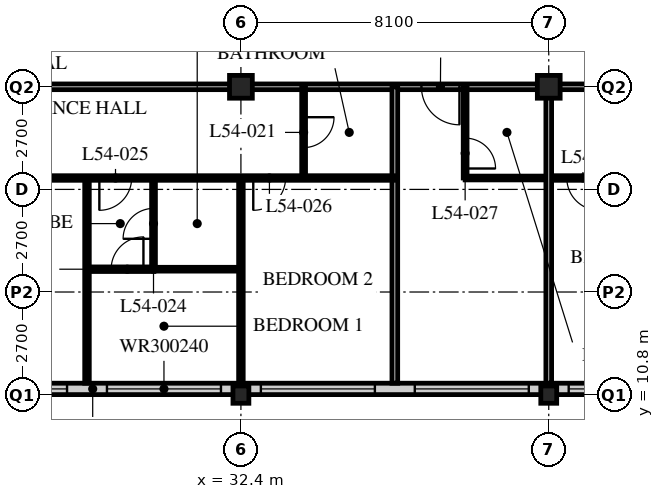
"""IFC4 building model, lengths in metres.
Left out: names, types, materials, properties, quantities, classifications, styles, units other than length and angle.
Written with IfcOpenShell. Run it as: python <this file> out.ifc"""

import sys

from ifc_helpers import new_model, si_unit, direction, frame, frame_2d, origin, origin_2d, place, context, subcontext, project, spatial, rectangle, hollow_rectangle, i_section, extrude, element, fill, save


model = new_model("IFC4")
c1 = context("Model", 3, precision=1e-05, world=origin(), true_north=direction((0.0, 1.0)))
c2 = subcontext(c1, "Body", "Model", "MODEL_VIEW")
j1 = project(units=[si_unit("LENGTHUNIT", "METRE"), si_unit("PLANEANGLEUNIT", "RADIAN")], contexts=[c1])
p1 = place(None, origin())
s1 = spatial("IfcSite", under=j1, at=p1, CompositionType="ELEMENT")
p2 = place(p1, origin())
s2 = spatial("IfcBuilding", under=s1, at=p2, CompositionType="ELEMENT")
p3 = place(p2, frame((0.0, 0.0, 210.0)))
s3 = spatial("IfcBuildingStorey", under=s2, at=p3, CompositionType="ELEMENT", Elevation=210.0)
p4 = place(p3, frame((32.4, 10.8, 0.0), z_axis=(0.0, 0.0, 1.0), x_axis=(1.0, 0.0, 0.0)))
e1 = element("IfcColumn", 1, at=p4, inside=s3, PredefinedType="COLUMN", context=c2, shape_type="SweptSolid", body=[
    extrude(i_section(OverallWidth=0.418, OverallDepth=0.456, WebThickness=0.042, FlangeThickness=0.067, FilletRadius=0.015, at=origin_2d()), origin(), (0.0, 0.0, 1.0), 3.6),
])
p5 = place(p3, frame((32.4, 18.9, 0.0), z_axis=(0.0, 0.0, 1.0), x_axis=(1.0, 0.0, 0.0)))
e2 = element("IfcColumn", 2, at=p5, inside=s3, PredefinedType="COLUMN", context=c2, shape_type="SweptSolid", body=[
    extrude(hollow_rectangle(XDim=0.6, YDim=0.6, WallThickness=0.05, at=origin_2d()), origin(), (0.0, 0.0, 1.0), 3.6),
])
p6 = place(p3, frame((40.5, 10.8, 0.0), z_axis=(0.0, 0.0, 1.0), x_axis=(1.0, 0.0, 0.0)))
e3 = element("IfcColumn", 3, at=p6, inside=s3, PredefinedType="COLUMN", context=c2, shape_type="SweptSolid", body=[
    extrude(i_section(OverallWidth=0.418, OverallDepth=0.456, WebThickness=0.042, FlangeThickness=0.067, FilletRadius=0.015, at=origin_2d()), origin(), (0.0, 0.0, 1.0), 3.6),
])
p7 = place(p3, frame((40.5, 18.9, 0.0), z_axis=(0.0, 0.0, 1.0), x_axis=(1.0, 0.0, 0.0)))
e4 = element("IfcColumn", 4, at=p7, inside=s3, PredefinedType="COLUMN", context=c2, shape_type="SweptSolid", body=[
    extrude(hollow_rectangle(XDim=0.6, YDim=0.6, WallThickness=0.05, at=origin_2d()), origin(), (0.0, 0.0, 1.0), 3.6),
])
p8 = place(p3, frame((8.4, 10.95, 0.0), z_axis=(0.0, 0.0, 1.0), x_axis=(1.0, 0.0, 0.0)))
e5 = element("IfcWall", 5, at=p8, inside=s3, PredefinedType="SOLIDWALL", context=c2, shape_type="SweptSolid", body=[
    extrude(rectangle(XDim=40.2, YDim=0.3, at=frame_2d((20.1, 0.0))), origin(), (0.0, 0.0, 1.0), 3.39),
])
p9 = place(p8, frame((0.225, 0.0, 0.6)))
e6 = element("IfcOpeningElement", 6, at=p9, cuts=e5, PredefinedType="OPENING", context=c2, shape_type="SweptSolid", body=[
    extrude(rectangle(XDim=3.0, YDim=2.4, at=frame_2d((1.5, 1.2))), frame((0.0, 0.16, 0.0), z_axis=(0.0, -1.0, 0.0), x_axis=(1.0, 0.0, 0.0)), (0.0, 0.0, 1.0), 0.32),
])
p10 = place(p8, frame((4.275, 0.0, 0.6)))
e7 = element("IfcOpeningElement", 7, at=p10, cuts=e5, PredefinedType="OPENING", context=c2, shape_type="SweptSolid", body=[
    extrude(rectangle(XDim=3.0, YDim=2.4, at=frame_2d((1.5, 1.2))), frame((0.0, 0.16, 0.0), z_axis=(0.0, -1.0, 0.0), x_axis=(1.0, 0.0, 0.0)), (0.0, 0.0, 1.0), 0.32),
])
p11 = place(p8, frame((8.325, 0.0, 0.6)))
e8 = element("IfcOpeningElement", 8, at=p11, cuts=e5, PredefinedType="OPENING", context=c2, shape_type="SweptSolid", body=[
    extrude(rectangle(XDim=3.0, YDim=2.4, at=frame_2d((1.5, 1.2))), frame((0.0, 0.16, 0.0), z_axis=(0.0, -1.0, 0.0), x_axis=(1.0, 0.0, 0.0)), (0.0, 0.0, 1.0), 0.32),
])
p12 = place(p8, frame((12.375, 0.0, 0.6)))
e9 = element("IfcOpeningElement", 9, at=p12, cuts=e5, PredefinedType="OPENING", context=c2, shape_type="SweptSolid", body=[
    extrude(rectangle(XDim=3.0, YDim=2.4, at=frame_2d((1.5, 1.2))), frame((0.0, 0.16, 0.0), z_axis=(0.0, -1.0, 0.0), x_axis=(1.0, 0.0, 0.0)), (0.0, 0.0, 1.0), 0.32),
])
p13 = place(p8, frame((16.425, 0.0, 0.6)))
e10 = element("IfcOpeningElement", 10, at=p13, cuts=e5, PredefinedType="OPENING", context=c2, shape_type="SweptSolid", body=[
    extrude(rectangle(XDim=3.0, YDim=2.4, at=frame_2d((1.5, 1.2))), frame((0.0, 0.16, 0.0), z_axis=(0.0, -1.0, 0.0), x_axis=(1.0, 0.0, 0.0)), (0.0, 0.0, 1.0), 0.32),
])
p14 = place(p8, frame((20.475, 0.0, 0.6)))
e11 = element("IfcOpeningElement", 11, at=p14, cuts=e5, PredefinedType="OPENING", context=c2, shape_type="SweptSolid", body=[
    extrude(rectangle(XDim=3.0, YDim=2.4, at=frame_2d((1.5, 1.2))), frame((0.0, 0.16, 0.0), z_axis=(0.0, -1.0, 0.0), x_axis=(1.0, 0.0, 0.0)), (0.0, 0.0, 1.0), 0.32),
])
p15 = place(p8, frame((24.525, 0.0, 0.6)))
e12 = element("IfcOpeningElement", 12, at=p15, cuts=e5, PredefinedType="OPENING", context=c2, shape_type="SweptSolid", body=[
    extrude(rectangle(XDim=3.0, YDim=2.4, at=frame_2d((1.5, 1.2))), frame((0.0, 0.16, 0.0), z_axis=(0.0, -1.0, 0.0), x_axis=(1.0, 0.0, 0.0)), (0.0, 0.0, 1.0), 0.32),
])
p16 = place(p8, frame((28.575, 0.0, 0.6)))
e13 = element("IfcOpeningElement", 13, at=p16, cuts=e5, PredefinedType="OPENING", context=c2, shape_type="SweptSolid", body=[
    extrude(rectangle(XDim=3.0, YDim=2.4, at=frame_2d((1.5, 1.2))), frame((0.0, 0.16, 0.0), z_axis=(0.0, -1.0, 0.0), x_axis=(1.0, 0.0, 0.0)), (0.0, 0.0, 1.0), 0.32),
])
p17 = place(p8, frame((32.625, 0.0, 0.6)))
e14 = element("IfcOpeningElement", 14, at=p17, cuts=e5, PredefinedType="OPENING", context=c2, shape_type="SweptSolid", body=[
    extrude(rectangle(XDim=3.0, YDim=2.4, at=frame_2d((1.5, 1.2))), frame((0.0, 0.16, 0.0), z_axis=(0.0, -1.0, 0.0), x_axis=(1.0, 0.0, 0.0)), (0.0, 0.0, 1.0), 0.32),
])
p18 = place(p8, frame((36.675, 0.0, 0.6)))
e15 = element("IfcOpeningElement", 15, at=p18, cuts=e5, PredefinedType="OPENING", context=c2, shape_type="SweptSolid", body=[
    extrude(rectangle(XDim=3.0, YDim=2.4, at=frame_2d((1.5, 1.2))), frame((0.0, 0.16, 0.0), z_axis=(0.0, -1.0, 0.0), x_axis=(1.0, 0.0, 0.0)), (0.0, 0.0, 1.0), 0.32),
])
p19 = place(p3, frame((8.1, 18.9, 0.0), z_axis=(0.0, 0.0, 1.0), x_axis=(1.0, 0.0, 0.0)))
e16 = element("IfcWall", 16, at=p19, inside=s3, PredefinedType="PARTITIONING", context=c2, shape_type="SweptSolid", body=[
    extrude(rectangle(XDim=36.45, YDim=0.15, at=frame_2d((18.225, 0.0))), origin(), (0.0, 0.0, 1.0), 2.778),
])
p20 = place(p19, frame((4.45, 0.0, 0.0)))
e17 = element("IfcOpeningElement", 17, at=p20, cuts=e16, PredefinedType="OPENING", context=c2, shape_type="SweptSolid", body=[
    extrude(rectangle(XDim=1.0, YDim=2.1, at=frame_2d((0.5, 1.05))), frame((0.0, 0.085, 0.0), z_axis=(0.0, -1.0, 0.0), x_axis=(1.0, 0.0, 0.0)), (0.0, 0.0, 1.0), 0.17),
])
p21 = place(p19, frame((12.55, 0.0, 0.0)))
e18 = element("IfcOpeningElement", 18, at=p21, cuts=e16, PredefinedType="OPENING", context=c2, shape_type="SweptSolid", body=[
    extrude(rectangle(XDim=1.0, YDim=2.1, at=frame_2d((0.5, 1.05))), frame((0.0, 0.085, 0.0), z_axis=(0.0, -1.0, 0.0), x_axis=(1.0, 0.0, 0.0)), (0.0, 0.0, 1.0), 0.17),
])
p22 = place(p19, frame((29.05, 0.0, 0.0)))
e19 = element("IfcOpeningElement", 19, at=p22, cuts=e16, PredefinedType="OPENING", context=c2, shape_type="SweptSolid", body=[
    extrude(rectangle(XDim=1.0, YDim=2.1, at=frame_2d((0.5, 1.05))), frame((0.0, 0.085, 0.0), z_axis=(0.0, -1.0, 0.0), x_axis=(1.0, 0.0, 0.0)), (0.0, 0.0, 1.0), 0.17),
])
p23 = place(p19, frame((2.625, 0.0, 0.0)))
e20 = element("IfcOpeningElement", 20, at=p23, cuts=e16, PredefinedType="OPENING", context=c2, shape_type="SweptSolid", body=[
    extrude(rectangle(XDim=1.0, YDim=2.1, at=frame_2d((0.5, 1.05))), frame((0.0, 0.085, 0.0), z_axis=(0.0, -1.0, 0.0), x_axis=(1.0, 0.0, 0.0)), (0.0, 0.0, 1.0), 0.17),
])
p24 = place(p19, frame((33.925, 0.0, 0.0)))
e21 = element("IfcOpeningElement", 21, at=p24, cuts=e16, PredefinedType="OPENING", context=c2, shape_type="SweptSolid", body=[
    extrude(rectangle(XDim=1.0, YDim=2.1, at=frame_2d((0.5, 1.05))), frame((0.0, 0.085, 0.0), z_axis=(0.0, -1.0, 0.0), x_axis=(1.0, 0.0, 0.0)), (0.0, 0.0, 1.0), 0.17),
])
p25 = place(p3, frame((34.05, 18.9, 0.0), z_axis=(0.0, 0.0, 1.0), x_axis=(0.0, -1.0, 0.0)))
e22 = element("IfcWall", 22, at=p25, inside=s3, PredefinedType="PARTITIONING", context=c2, shape_type="SweptSolid", body=[
    extrude(rectangle(XDim=2.4, YDim=0.1, at=frame_2d((1.2, 0.0))), origin(), (0.0, 0.0, 1.0), 3.39),
])
p26 = place(p25, frame((0.8, 0.0, 0.0)))
e23 = element("IfcOpeningElement", 23, at=p26, cuts=e22, PredefinedType="OPENING", context=c2, shape_type="SweptSolid", body=[
    extrude(rectangle(XDim=0.8, YDim=2.1, at=frame_2d((0.4, 1.05))), frame((0.0, 0.06, 0.0), z_axis=(0.0, -1.0, 0.0), x_axis=(1.0, 0.0, 0.0)), (0.0, 0.0, 1.0), 0.12),
])
p27 = place(p3, frame((30.1, 16.5, 0.0), z_axis=(0.0, 0.0, 1.0), x_axis=(0.0, -1.0, 0.0)))
e24 = element("IfcWall", 24, at=p27, inside=s3, PredefinedType="PARTITIONING", context=c2, shape_type="SweptSolid", body=[
    extrude(rectangle(XDim=2.4, YDim=0.1, at=frame_2d((1.2, 0.0))), origin(), (0.0, 0.0, 1.0), 3.39),
])
p28 = place(p27, frame((0.8, 0.0, 0.0)))
e25 = element("IfcOpeningElement", 25, at=p28, cuts=e24, PredefinedType="OPENING", context=c2, shape_type="SweptSolid", body=[
    extrude(rectangle(XDim=0.8, YDim=2.1, at=frame_2d((0.4, 1.05))), frame((0.0, 0.06, 0.0), z_axis=(0.0, -1.0, 0.0), x_axis=(1.0, 0.0, 0.0)), (0.0, 0.0, 1.0), 0.12),
])
p29 = place(p3, frame((30.1, 14.1, 0.0), z_axis=(0.0, 0.0, 1.0), x_axis=(1.0, 0.0, 0.0)))
e26 = element("IfcWall", 26, at=p29, inside=s3, PredefinedType="PARTITIONING", context=c2, shape_type="SweptSolid", body=[
    extrude(rectangle(XDim=2.3, YDim=0.1, at=frame_2d((1.15, 0.0))), origin(), (0.0, 0.0, 1.0), 3.39),
])
p30 = place(p3, frame((28.35, 16.5, 0.0), z_axis=(0.0, 0.0, 1.0), x_axis=(0.0, -1.0, 0.0)))
e27 = element("IfcWall", 27, at=p30, inside=s3, PredefinedType="PARTITIONING", context=c2, shape_type="SweptSolid", body=[
    extrude(rectangle(XDim=5.4, YDim=0.12, at=frame_2d((2.7, 0.0))), origin(), (0.0, 0.0, 1.0), 3.39),
])
p31 = place(p3, frame((32.4, 16.5, 0.0), z_axis=(0.0, 0.0, 1.0), x_axis=(0.0, -1.0, 0.0)))
e28 = element("IfcWall", 28, at=p31, inside=s3, PredefinedType="PARTITIONING", context=c2, shape_type="SweptSolid", body=[
    extrude(rectangle(XDim=5.4, YDim=0.12, at=frame_2d((2.7, 0.0))), origin(), (0.0, 0.0, 1.0), 2.778),
])
p32 = place(p3, frame((36.45, 18.9, 0.0), z_axis=(0.0, 0.0, 1.0), x_axis=(0.0, -1.0, 0.0)))
e29 = element("IfcWall", 29, at=p32, inside=s3, PredefinedType="PARTITIONING", context=c2, shape_type="SweptSolid", body=[
    extrude(rectangle(XDim=7.8, YDim=0.15, at=frame_2d((3.9, 0.0))), origin(), (0.0, 0.0, 1.0), 3.39),
])
p33 = place(p3, frame((38.3, 16.5, 0.0), z_axis=(0.0, 0.0, 1.0), x_axis=(1.0, 0.0, 0.0)))
e30 = element("IfcWall", 30, at=p33, inside=s3, PredefinedType="PARTITIONING", context=c2, shape_type="SweptSolid", body=[
    extrude(rectangle(XDim=2.2, YDim=0.1, at=frame_2d((1.1, 0.0))), origin(), (0.0, 0.0, 1.0), 3.39),
])
p34 = place(p3, frame((38.3, 18.9, 0.0), z_axis=(0.0, 0.0, 1.0), x_axis=(0.0, -1.0, 0.0)))
e31 = element("IfcWall", 31, at=p34, inside=s3, PredefinedType="PARTITIONING", context=c2, shape_type="SweptSolid", body=[
    extrude(rectangle(XDim=2.4, YDim=0.1, at=frame_2d((1.2, 0.0))), origin(), (0.0, 0.0, 1.0), 3.39),
])
p35 = place(p34, frame((1.35, 0.0, 0.0)))
e32 = element("IfcOpeningElement", 32, at=p35, cuts=e31, PredefinedType="OPENING", context=c2, shape_type="SweptSolid", body=[
    extrude(rectangle(XDim=0.8, YDim=2.1, at=frame_2d((0.4, 1.05))), frame((0.0, 0.06, 0.0), z_axis=(0.0, -1.0, 0.0), x_axis=(1.0, 0.0, 0.0)), (0.0, 0.0, 1.0), 0.12),
])
p36 = place(p3, frame((8.1, 16.5, 0.0), z_axis=(0.0, 0.0, 1.0), x_axis=(1.0, 0.0, 0.0)))
e33 = element("IfcWall", 33, at=p36, inside=s3, PredefinedType="PARTITIONING", context=c2, shape_type="SweptSolid", body=[
    extrude(rectangle(XDim=28.35, YDim=0.12, at=frame_2d((14.175, 0.0))), origin(), (0.0, 0.0, 1.0), 3.39),
])
p37 = place(p36, frame((5.025, 0.0, 0.0)))
e34 = element("IfcOpeningElement", 34, at=p37, cuts=e33, PredefinedType="OPENING", context=c2, shape_type="SweptSolid", body=[
    extrude(rectangle(XDim=0.85, YDim=2.1, at=frame_2d((0.425, 1.05))), frame((0.0, 0.07, 0.0), z_axis=(0.0, -1.0, 0.0), x_axis=(1.0, 0.0, 0.0)), (0.0, 0.0, 1.0), 0.14),
])
p38 = place(p36, frame((8.425, 0.0, 0.0)))
e35 = element("IfcOpeningElement", 35, at=p38, cuts=e33, PredefinedType="OPENING", context=c2, shape_type="SweptSolid", body=[
    extrude(rectangle(XDim=0.85, YDim=2.1, at=frame_2d((0.425, 1.05))), frame((0.0, 0.07, 0.0), z_axis=(0.0, -1.0, 0.0), x_axis=(1.0, 0.0, 0.0)), (0.0, 0.0, 1.0), 0.14),
])
p39 = place(p36, frame((13.125, 0.0, 0.0)))
e36 = element("IfcOpeningElement", 36, at=p39, cuts=e33, PredefinedType="OPENING", context=c2, shape_type="SweptSolid", body=[
    extrude(rectangle(XDim=0.85, YDim=2.1, at=frame_2d((0.425, 1.05))), frame((0.0, 0.07, 0.0), z_axis=(0.0, -1.0, 0.0), x_axis=(1.0, 0.0, 0.0)), (0.0, 0.0, 1.0), 0.14),
])
p40 = place(p36, frame((20.575, 0.0, 0.0)))
e37 = element("IfcOpeningElement", 37, at=p40, cuts=e33, PredefinedType="OPENING", context=c2, shape_type="SweptSolid", body=[
    extrude(rectangle(XDim=0.85, YDim=2.1, at=frame_2d((0.425, 1.05))), frame((0.0, 0.07, 0.0), z_axis=(0.0, -1.0, 0.0), x_axis=(1.0, 0.0, 0.0)), (0.0, 0.0, 1.0), 0.14),
])
p41 = place(p36, frame((24.625, 0.0, 0.0)))
e38 = element("IfcOpeningElement", 38, at=p41, cuts=e33, PredefinedType="OPENING", context=c2, shape_type="SweptSolid", body=[
    extrude(rectangle(XDim=0.85, YDim=2.1, at=frame_2d((0.425, 1.05))), frame((0.0, 0.07, 0.0), z_axis=(0.0, -1.0, 0.0), x_axis=(1.0, 0.0, 0.0)), (0.0, 0.0, 1.0), 0.14),
])
p42 = place(p36, frame((2.725, 0.0, 0.0)))
e39 = element("IfcOpeningElement", 39, at=p42, cuts=e33, PredefinedType="OPENING", context=c2, shape_type="SweptSolid", body=[
    extrude(rectangle(XDim=0.85, YDim=2.1, at=frame_2d((0.425, 1.05))), frame((0.0, 0.07, 0.0), z_axis=(0.0, -1.0, 0.0), x_axis=(1.0, 0.0, 0.0)), (0.0, 0.0, 1.0), 0.14),
])
p43 = place(p3, frame((40.5, 16.5, 0.0), z_axis=(0.0, 0.0, 1.0), x_axis=(1.0, 0.0, 0.0)))
e40 = element("IfcWall", 40, at=p43, inside=s3, PredefinedType="PARTITIONING", context=c2, shape_type="SweptSolid", body=[
    extrude(rectangle(XDim=8.05, YDim=0.12, at=frame_2d((4.025, 0.0))), origin(), (0.0, 0.0, 1.0), 3.39),
])
p44 = place(p43, frame((0.475, 0.0, 0.0)))
e41 = element("IfcOpeningElement", 41, at=p44, cuts=e40, PredefinedType="OPENING", context=c2, shape_type="SweptSolid", body=[
    extrude(rectangle(XDim=0.85, YDim=2.1, at=frame_2d((0.425, 1.05))), frame((0.0, 0.07, 0.0), z_axis=(0.0, -1.0, 0.0), x_axis=(1.0, 0.0, 0.0)), (0.0, 0.0, 1.0), 0.14),
])
p45 = place(p43, frame((4.325, 0.0, 0.0)))
e42 = element("IfcOpeningElement", 42, at=p45, cuts=e40, PredefinedType="OPENING", context=c2, shape_type="SweptSolid", body=[
    extrude(rectangle(XDim=0.85, YDim=2.1, at=frame_2d((0.425, 1.05))), frame((0.0, 0.07, 0.0), z_axis=(0.0, -1.0, 0.0), x_axis=(1.0, 0.0, 0.0)), (0.0, 0.0, 1.0), 0.14),
])
p46 = place(p3, frame((40.5, 18.9, 0.0), z_axis=(0.0, 0.0, 1.0), x_axis=(0.0, -1.0, 0.0)))
e43 = element("IfcWall", 43, at=p46, inside=s3, PredefinedType="PARTITIONING", context=c2, shape_type="SweptSolid", body=[
    extrude(rectangle(XDim=7.8, YDim=0.15, at=frame_2d((3.9, 0.0))), origin(), (0.0, 0.0, 1.0), 2.778),
])
p47 = place(p3, frame((30.11, 14.1, 0.0), z_axis=(0.0, 0.0, 1.0), x_axis=(-1.0, 0.0, 0.0)))
e44 = element("IfcWall", 44, at=p47, inside=s3, PredefinedType="PARTITIONING", context=c2, shape_type="SweptSolid", body=[
    extrude(rectangle(XDim=1.76, YDim=0.12, at=frame_2d((0.88, 0.0))), origin(), (0.0, 0.0, 1.0), 3.39),
])
p48 = place(p47, frame((0.275, 0.0, 0.0)))
e45 = element("IfcOpeningElement", 45, at=p48, cuts=e44, PredefinedType="OPENING", context=c2, shape_type="SweptSolid", body=[
    extrude(rectangle(XDim=0.85, YDim=2.1, at=frame_2d((0.425, 1.05))), frame((0.0, 0.07, 0.0), z_axis=(0.0, -1.0, 0.0), x_axis=(1.0, 0.0, 0.0)), (0.0, 0.0, 1.0), 0.14),
])
p49 = place(p13, origin())
e46 = element("IfcWindow", 46, at=p49, inside=s3, PartitioningType="SINGLE_PANEL", PredefinedType="WINDOW", context=c2, shape_type="SweptSolid", body=[
    extrude(rectangle(XDim=3.0, YDim=2.4, at=frame_2d((1.5, 1.2))), frame((0.0, 0.03, 0.0), z_axis=(0.0, -1.0, 0.0), x_axis=(1.0, 0.0, 0.0)), (0.0, 0.0, 1.0), 0.06),
])
fill(e10, e46)
p50 = place(p14, origin())
e47 = element("IfcWindow", 47, at=p50, inside=s3, PartitioningType="SINGLE_PANEL", PredefinedType="WINDOW", context=c2, shape_type="SweptSolid", body=[
    extrude(rectangle(XDim=3.0, YDim=2.4, at=frame_2d((1.5, 1.2))), frame((0.0, 0.03, 0.0), z_axis=(0.0, -1.0, 0.0), x_axis=(1.0, 0.0, 0.0)), (0.0, 0.0, 1.0), 0.06),
])
fill(e11, e47)
p51 = place(p15, origin())
e48 = element("IfcWindow", 48, at=p51, inside=s3, PartitioningType="SINGLE_PANEL", PredefinedType="WINDOW", context=c2, shape_type="SweptSolid", body=[
    extrude(rectangle(XDim=3.0, YDim=2.4, at=frame_2d((1.5, 1.2))), frame((0.0, 0.03, 0.0), z_axis=(0.0, -1.0, 0.0), x_axis=(1.0, 0.0, 0.0)), (0.0, 0.0, 1.0), 0.06),
])
fill(e12, e48)
p52 = place(p16, origin())
e49 = element("IfcWindow", 49, at=p52, inside=s3, PartitioningType="SINGLE_PANEL", PredefinedType="WINDOW", context=c2, shape_type="SweptSolid", body=[
    extrude(rectangle(XDim=3.0, YDim=2.4, at=frame_2d((1.5, 1.2))), frame((0.0, 0.03, 0.0), z_axis=(0.0, -1.0, 0.0), x_axis=(1.0, 0.0, 0.0)), (0.0, 0.0, 1.0), 0.06),
])
fill(e13, e49)
p53 = place(p17, origin())
e50 = element("IfcWindow", 50, at=p53, inside=s3, PartitioningType="SINGLE_PANEL", PredefinedType="WINDOW", context=c2, shape_type="SweptSolid", body=[
    extrude(rectangle(XDim=3.0, YDim=2.4, at=frame_2d((1.5, 1.2))), frame((0.0, 0.03, 0.0), z_axis=(0.0, -1.0, 0.0), x_axis=(1.0, 0.0, 0.0)), (0.0, 0.0, 1.0), 0.06),
])
fill(e14, e50)
p54 = place(p26, origin())
e51 = element("IfcDoor", 51, at=p54, inside=s3, OperationType="SINGLE_SWING_LEFT", PredefinedType="DOOR", context=c2, shape_type="SweptSolid", body=[
    extrude(rectangle(XDim=0.8, YDim=2.1, at=frame_2d((0.4, 1.05))), frame((0.0, 0.025, 0.0), z_axis=(0.0, -1.0, 0.0), x_axis=(1.0, 0.0, 0.0)), (0.0, 0.0, 1.0), 0.05),
])
fill(e23, e51)
p55 = place(p28, origin())
e52 = element("IfcDoor", 52, at=p55, inside=s3, OperationType="SINGLE_SWING_LEFT", PredefinedType="DOOR", context=c2, shape_type="SweptSolid", body=[
    extrude(rectangle(XDim=0.8, YDim=2.1, at=frame_2d((0.4, 1.05))), frame((0.0, 0.025, 0.0), z_axis=(0.0, -1.0, 0.0), x_axis=(1.0, 0.0, 0.0)), (0.0, 0.0, 1.0), 0.05),
])
fill(e25, e52)
p56 = place(p40, origin())
e53 = element("IfcDoor", 53, at=p56, inside=s3, OperationType="SINGLE_SWING_RIGHT", PredefinedType="DOOR", context=c2, shape_type="SweptSolid", body=[
    extrude(rectangle(XDim=0.85, YDim=2.1, at=frame_2d((0.425, 1.05))), frame((0.0, 0.025, 0.0), z_axis=(0.0, -1.0, 0.0), x_axis=(1.0, 0.0, 0.0)), (0.0, 0.0, 1.0), 0.05),
])
fill(e37, e53)
p57 = place(p41, origin())
e54 = element("IfcDoor", 54, at=p57, inside=s3, OperationType="SINGLE_SWING_RIGHT", PredefinedType="DOOR", context=c2, shape_type="SweptSolid", body=[
    extrude(rectangle(XDim=0.85, YDim=2.1, at=frame_2d((0.425, 1.05))), frame((0.0, 0.025, 0.0), z_axis=(0.0, -1.0, 0.0), x_axis=(1.0, 0.0, 0.0)), (0.0, 0.0, 1.0), 0.05),
])
fill(e38, e54)
p58 = place(p35, origin())
e55 = element("IfcDoor", 55, at=p58, inside=s3, OperationType="SINGLE_SWING_RIGHT", PredefinedType="DOOR", context=c2, shape_type="SweptSolid", body=[
    extrude(rectangle(XDim=0.8, YDim=2.1, at=frame_2d((0.4, 1.05))), frame((0.0, 0.025, 0.0), z_axis=(0.0, -1.0, 0.0), x_axis=(1.0, 0.0, 0.0)), (0.0, 0.0, 1.0), 0.05),
])
fill(e32, e55)
p59 = place(p22, origin())
e56 = element("IfcDoor", 56, at=p59, inside=s3, OperationType="SINGLE_SWING_LEFT", PredefinedType="DOOR", context=c2, shape_type="SweptSolid", body=[
    extrude(rectangle(XDim=1.0, YDim=2.1, at=frame_2d((0.5, 1.05))), frame((0.0, 0.025, 0.0), z_axis=(0.0, -1.0, 0.0), x_axis=(1.0, 0.0, 0.0)), (0.0, 0.0, 1.0), 0.05),
])
fill(e19, e56)
p60 = place(p44, origin())
e57 = element("IfcDoor", 57, at=p60, inside=s3, OperationType="SINGLE_SWING_LEFT", PredefinedType="DOOR", context=c2, shape_type="SweptSolid", body=[
    extrude(rectangle(XDim=0.85, YDim=2.1, at=frame_2d((0.425, 1.05))), frame((0.0, 0.025, 0.0), z_axis=(0.0, -1.0, 0.0), x_axis=(1.0, 0.0, 0.0)), (0.0, 0.0, 1.0), 0.05),
])
fill(e41, e57)
p61 = place(p48, origin())
e58 = element("IfcDoor", 58, at=p61, inside=s3, OperationType="SINGLE_SWING_RIGHT", PredefinedType="DOOR", context=c2, shape_type="SweptSolid", body=[
    extrude(rectangle(XDim=0.85, YDim=2.1, at=frame_2d((0.425, 1.05))), frame((0.0, 0.025, 0.0), z_axis=(0.0, -1.0, 0.0), x_axis=(1.0, 0.0, 0.0)), (0.0, 0.0, 1.0), 0.05),
])
fill(e45, e58)
save(model, sys.argv[1])
